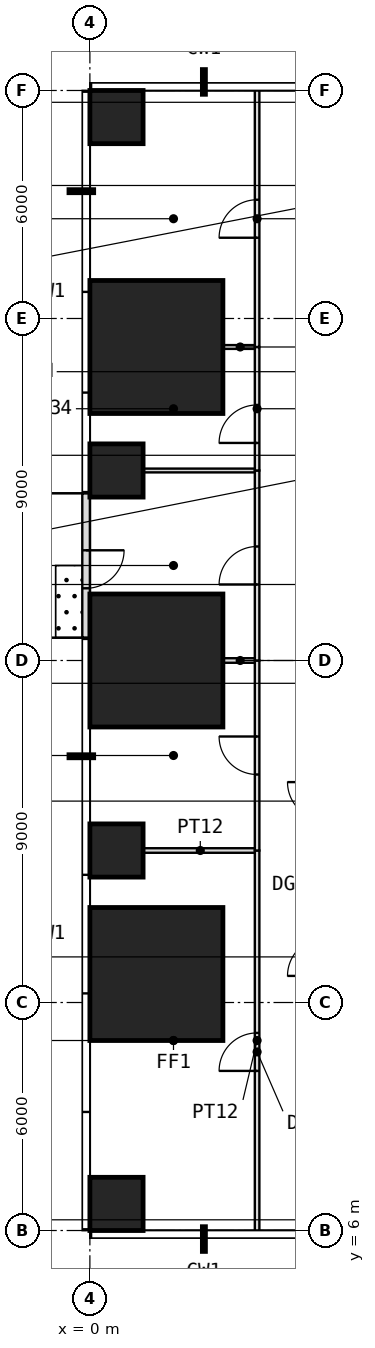
"""IFC4 building model, lengths in metres.
Left out: names, types, materials, properties, quantities, classifications, styles, units other than length and angle.
Written with IfcOpenShell. Run it as: python <this file> out.ifc"""

import sys

from ifc_helpers import new_model, si_unit, direction, frame, frame_2d, origin, origin_2d, place, context, subcontext, project, spatial, rectangle, extrude, element, fill, save


model = new_model("IFC4")
c1 = context("Model", 3, precision=1e-05, world=origin(), true_north=direction((0.0, 1.0)))
c2 = subcontext(c1, "Body", "Model", "MODEL_VIEW")
j1 = project(units=[si_unit("LENGTHUNIT", "METRE"), si_unit("PLANEANGLEUNIT", "RADIAN")], contexts=[c1])
p1 = place(None, origin())
s1 = spatial("IfcSite", under=j1, at=p1, CompositionType="ELEMENT")
p2 = place(p1, origin())
s2 = spatial("IfcBuilding", under=s1, at=p2, CompositionType="ELEMENT")
p3 = place(p2, frame((0.0, 0.0, 82.5)))
s3 = spatial("IfcBuildingStorey", under=s2, at=p3, CompositionType="ELEMENT", Elevation=82.5)
p4 = place(p3, frame((0.7, 6.7, 0.0), z_axis=(0.0, 0.0, 1.0), x_axis=(1.0, 0.0, 0.0)))
e1 = element("IfcColumn", 1, at=p4, inside=s3, PredefinedType="COLUMN", context=c2, shape_type="SweptSolid", body=[
    extrude(rectangle(XDim=1.4, YDim=1.4, at=origin_2d()), origin(), (0.0, 0.0, 1.0), 4.0),
])
p5 = place(p3, frame((1.75, 12.75, 0.0), z_axis=(0.0, 0.0, 1.0), x_axis=(1.0, 0.0, 0.0)))
e2 = element("IfcColumn", 2, at=p5, inside=s3, PredefinedType="COLUMN", context=c2, shape_type="SweptSolid", body=[
    extrude(rectangle(XDim=3.5, YDim=3.5, at=origin_2d()), origin(), (0.0, 0.0, 1.0), 4.0),
])
p6 = place(p3, frame((0.7, 16.0, 0.0), z_axis=(0.0, 0.0, 1.0), x_axis=(1.0, 0.0, 0.0)))
e3 = element("IfcColumn", 3, at=p6, inside=s3, PredefinedType="COLUMN", context=c2, shape_type="SweptSolid", body=[
    extrude(rectangle(XDim=1.4, YDim=1.4, at=origin_2d()), origin(), (0.0, 0.0, 1.0), 4.0),
])
p7 = place(p3, frame((1.75, 21.0, 0.0), z_axis=(0.0, 0.0, 1.0), x_axis=(1.0, 0.0, 0.0)))
e4 = element("IfcColumn", 4, at=p7, inside=s3, PredefinedType="COLUMN", context=c2, shape_type="SweptSolid", body=[
    extrude(rectangle(XDim=3.5, YDim=3.5, at=origin_2d()), origin(), (0.0, 0.0, 1.0), 4.0),
])
p8 = place(p3, frame((0.7, 26.0, 0.0), z_axis=(0.0, 0.0, 1.0), x_axis=(1.0, 0.0, 0.0)))
e5 = element("IfcColumn", 5, at=p8, inside=s3, PredefinedType="COLUMN", context=c2, shape_type="SweptSolid", body=[
    extrude(rectangle(XDim=1.4, YDim=1.4, at=origin_2d()), origin(), (0.0, 0.0, 1.0), 4.0),
])
p9 = place(p3, frame((1.75, 29.25, 0.0), z_axis=(0.0, 0.0, 1.0), x_axis=(1.0, 0.0, 0.0)))
e6 = element("IfcColumn", 6, at=p9, inside=s3, PredefinedType="COLUMN", context=c2, shape_type="SweptSolid", body=[
    extrude(rectangle(XDim=3.5, YDim=3.5, at=origin_2d()), origin(), (0.0, 0.0, 1.0), 4.0),
])
p10 = place(p3, frame((0.7, 35.3, 0.0), z_axis=(0.0, 0.0, 1.0), x_axis=(1.0, 0.0, 0.0)))
e7 = element("IfcColumn", 7, at=p10, inside=s3, PredefinedType="COLUMN", context=c2, shape_type="SweptSolid", body=[
    extrude(rectangle(XDim=1.4, YDim=1.4, at=origin_2d()), origin(), (0.0, 0.0, 1.0), 4.0),
])
p11 = place(p3, frame((-0.1, 25.4, 0.0), z_axis=(0.0, 0.0, 1.0), x_axis=(0.0, -1.0, 0.0)))
e8 = element("IfcWall", 8, at=p11, inside=s3, PredefinedType="USERDEFINED", context=c2, shape_type="SweptSolid", body=[
    extrude(rectangle(XDim=3.8, YDim=0.2, at=frame_2d((1.9, 0.0))), origin(), (0.0, 0.0, 1.0), 3.55),
])
p12 = place(p11, frame((1.5, 0.0, 0.0)))
e9 = element("IfcOpeningElement", 9, at=p12, cuts=e8, PredefinedType="OPENING", context=c2, shape_type="SweptSolid", body=[
    extrude(rectangle(XDim=1.0, YDim=2.4, at=frame_2d((0.5, 1.2))), frame((0.0, 0.11, 0.0), z_axis=(0.0, -1.0, 0.0), x_axis=(1.0, 0.0, 0.0)), (0.0, 0.0, 1.0), 0.22),
])
p13 = place(p3, frame((1.41, 16.0, 0.0), z_axis=(0.0, 0.0, 1.0), x_axis=(1.0, 0.0, 0.0)))
e10 = element("IfcWall", 10, at=p13, inside=s3, PredefinedType="PARTITIONING", context=c2, shape_type="SweptSolid", body=[
    extrude(rectangle(XDim=2.99, YDim=0.12, at=frame_2d((1.495, 0.0))), origin(), (0.0, 0.0, 1.0), 2.736),
])
p14 = place(p3, frame((1.41, 26.0, 0.0), z_axis=(0.0, 0.0, 1.0), x_axis=(1.0, 0.0, 0.0)))
e11 = element("IfcWall", 11, at=p14, inside=s3, PredefinedType="PARTITIONING", context=c2, shape_type="SweptSolid", body=[
    extrude(rectangle(XDim=2.99, YDim=0.1, at=frame_2d((1.495, 0.0))), origin(), (0.0, 0.0, 1.0), 2.736),
])
p15 = place(p3, frame((3.51, 21.0, 0.0), z_axis=(0.0, 0.0, 1.0), x_axis=(1.0, 0.0, 0.0)))
e12 = element("IfcWall", 12, at=p15, inside=s3, PredefinedType="PARTITIONING", context=c2, shape_type="SweptSolid", body=[
    extrude(rectangle(XDim=0.89, YDim=0.12, at=frame_2d((0.445, 0.0))), origin(), (0.0, 0.0, 1.0), 3.55),
])
p16 = place(p3, frame((3.51, 29.25, 0.0), z_axis=(0.0, 0.0, 1.0), x_axis=(1.0, 0.0, 0.0)))
e13 = element("IfcWall", 13, at=p16, inside=s3, PredefinedType="PARTITIONING", context=c2, shape_type="SweptSolid", body=[
    extrude(rectangle(XDim=0.89, YDim=0.1, at=frame_2d((0.445, 0.0))), origin(), (0.0, 0.0, 1.0), 3.55),
])
p17 = place(p3, frame((4.4, 6.0, 0.0), z_axis=(0.0, 0.0, 1.0), x_axis=(0.0, 1.0, 0.0)))
e14 = element("IfcWall", 14, at=p17, inside=s3, PredefinedType="PARTITIONING", context=c2, shape_type="SweptSolid", body=[
    extrude(rectangle(XDim=10.0, YDim=0.12, at=frame_2d((5.0, 0.0))), origin(), (0.0, 0.0, 1.0), 3.55),
])
p18 = place(p17, frame((4.2, 0.0, 0.0)))
e15 = element("IfcOpeningElement", 15, at=p18, cuts=e14, PredefinedType="OPENING", context=c2, shape_type="SweptSolid", body=[
    extrude(rectangle(XDim=1.0, YDim=2.4, at=frame_2d((0.5, 1.2))), frame((0.0, 0.07, 0.0), z_axis=(0.0, -1.0, 0.0), x_axis=(1.0, 0.0, 0.0)), (0.0, 0.0, 1.0), 0.14),
])
p19 = place(p3, frame((4.4, 16.0, 0.0), z_axis=(0.0, 0.0, 1.0), x_axis=(0.0, 1.0, 0.0)))
e16 = element("IfcWall", 16, at=p19, inside=s3, PredefinedType="PARTITIONING", context=c2, shape_type="SweptSolid", body=[
    extrude(rectangle(XDim=5.0, YDim=0.12, at=frame_2d((2.5, 0.0))), origin(), (0.0, 0.0, 1.0), 3.55),
])
p20 = place(p19, frame((2.0, 0.0, 0.0)))
e17 = element("IfcOpeningElement", 17, at=p20, cuts=e16, PredefinedType="OPENING", context=c2, shape_type="SweptSolid", body=[
    extrude(rectangle(XDim=1.0, YDim=2.2, at=frame_2d((0.5, 1.1))), frame((0.0, 0.07, 0.0), z_axis=(0.0, -1.0, 0.0), x_axis=(1.0, 0.0, 0.0)), (0.0, 0.0, 1.0), 0.14),
])
p21 = place(p3, frame((4.4, 21.0, 0.0), z_axis=(0.0, 0.0, 1.0), x_axis=(0.0, 1.0, 0.0)))
e18 = element("IfcWall", 18, at=p21, inside=s3, PredefinedType="PARTITIONING", context=c2, shape_type="SweptSolid", body=[
    extrude(rectangle(XDim=5.0, YDim=0.12, at=frame_2d((2.5, 0.0))), origin(), (0.0, 0.0, 1.0), 3.55),
])
p22 = place(p21, frame((2.0, 0.0, 0.0)))
e19 = element("IfcOpeningElement", 19, at=p22, cuts=e18, PredefinedType="OPENING", context=c2, shape_type="SweptSolid", body=[
    extrude(rectangle(XDim=1.0, YDim=2.4, at=frame_2d((0.5, 1.2))), frame((0.0, 0.07, 0.0), z_axis=(0.0, -1.0, 0.0), x_axis=(1.0, 0.0, 0.0)), (0.0, 0.0, 1.0), 0.14),
])
p23 = place(p3, frame((4.4, 26.0, 0.0), z_axis=(0.0, 0.0, 1.0), x_axis=(0.0, 1.0, 0.0)))
e20 = element("IfcWall", 20, at=p23, inside=s3, PredefinedType="PARTITIONING", context=c2, shape_type="SweptSolid", body=[
    extrude(rectangle(XDim=3.25, YDim=0.12, at=frame_2d((1.625, 0.0))), origin(), (0.0, 0.0, 1.0), 3.55),
])
p24 = place(p23, frame((0.725, 0.0, 0.0)))
e21 = element("IfcOpeningElement", 21, at=p24, cuts=e20, PredefinedType="OPENING", context=c2, shape_type="SweptSolid", body=[
    extrude(rectangle(XDim=1.0, YDim=2.4, at=frame_2d((0.5, 1.2))), frame((0.0, 0.07, 0.0), z_axis=(0.0, -1.0, 0.0), x_axis=(1.0, 0.0, 0.0)), (0.0, 0.0, 1.0), 0.14),
])
p25 = place(p3, frame((4.4, 29.25, 0.0), z_axis=(0.0, 0.0, 1.0), x_axis=(0.0, 1.0, 0.0)))
e22 = element("IfcWall", 22, at=p25, inside=s3, PredefinedType="PARTITIONING", context=c2, shape_type="SweptSolid", body=[
    extrude(rectangle(XDim=6.75, YDim=0.12, at=frame_2d((3.375, 0.0))), origin(), (0.0, 0.0, 1.0), 3.55),
])
p26 = place(p25, frame((2.875, 0.0, 0.0)))
e23 = element("IfcOpeningElement", 23, at=p26, cuts=e22, PredefinedType="OPENING", context=c2, shape_type="SweptSolid", body=[
    extrude(rectangle(XDim=1.0, YDim=2.4, at=frame_2d((0.5, 1.2))), frame((0.0, 0.07, 0.0), z_axis=(0.0, -1.0, 0.0), x_axis=(1.0, 0.0, 0.0)), (0.0, 0.0, 1.0), 0.14),
])
p27 = place(p12, origin())
e24 = element("IfcDoor", 24, at=p27, inside=s3, OperationType="SINGLE_SWING_LEFT", PredefinedType="DOOR", context=c2, shape_type="SweptSolid", body=[
    extrude(rectangle(XDim=1.0, YDim=2.4, at=frame_2d((0.5, 1.2))), frame((0.0, 0.025, 0.0), z_axis=(0.0, -1.0, 0.0), x_axis=(1.0, 0.0, 0.0)), (0.0, 0.0, 1.0), 0.05),
])
fill(e9, e24)
p28 = place(p20, origin())
e25 = element("IfcDoor", 25, at=p28, inside=s3, OperationType="SINGLE_SWING_RIGHT", PredefinedType="DOOR", context=c2, shape_type="SweptSolid", body=[
    extrude(rectangle(XDim=1.0, YDim=2.2, at=frame_2d((0.5, 1.1))), frame((0.0, 0.025, 0.0), z_axis=(0.0, -1.0, 0.0), x_axis=(1.0, 0.0, 0.0)), (0.0, 0.0, 1.0), 0.05),
])
fill(e17, e25)
p29 = place(p24, origin())
e26 = element("IfcDoor", 26, at=p29, inside=s3, OperationType="SINGLE_SWING_LEFT", PredefinedType="DOOR", context=c2, shape_type="SweptSolid", body=[
    extrude(rectangle(XDim=1.0, YDim=2.4, at=frame_2d((0.5, 1.2))), frame((0.0, 0.025, 0.0), z_axis=(0.0, -1.0, 0.0), x_axis=(1.0, 0.0, 0.0)), (0.0, 0.0, 1.0), 0.05),
])
fill(e21, e26)
p30 = place(p18, origin())
e27 = element("IfcDoor", 27, at=p30, inside=s3, OperationType="SINGLE_SWING_LEFT", PredefinedType="DOOR", context=c2, shape_type="SweptSolid", body=[
    extrude(rectangle(XDim=1.0, YDim=2.4, at=frame_2d((0.5, 1.2))), frame((0.0, 0.025, 0.0), z_axis=(0.0, -1.0, 0.0), x_axis=(1.0, 0.0, 0.0)), (0.0, 0.0, 1.0), 0.05),
])
fill(e15, e27)
p31 = place(p22, origin())
e28 = element("IfcDoor", 28, at=p31, inside=s3, OperationType="SINGLE_SWING_LEFT", PredefinedType="DOOR", context=c2, shape_type="SweptSolid", body=[
    extrude(rectangle(XDim=1.0, YDim=2.4, at=frame_2d((0.5, 1.2))), frame((0.0, 0.025, 0.0), z_axis=(0.0, -1.0, 0.0), x_axis=(1.0, 0.0, 0.0)), (0.0, 0.0, 1.0), 0.05),
])
fill(e19, e28)
p32 = place(p26, origin())
e29 = element("IfcDoor", 29, at=p32, inside=s3, OperationType="SINGLE_SWING_LEFT", PredefinedType="DOOR", context=c2, shape_type="SweptSolid", body=[
    extrude(rectangle(XDim=1.0, YDim=2.4, at=frame_2d((0.5, 1.2))), frame((0.0, 0.025, 0.0), z_axis=(0.0, -1.0, 0.0), x_axis=(1.0, 0.0, 0.0)), (0.0, 0.0, 1.0), 0.05),
])
fill(e23, e29)
save(model, sys.argv[1])
